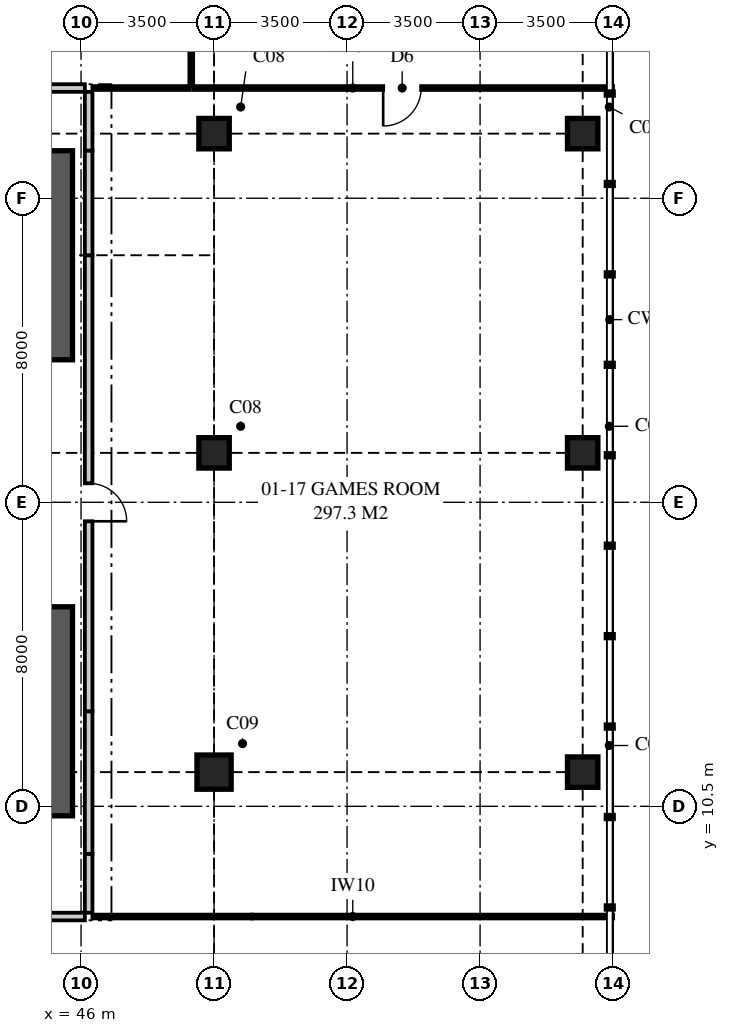
"""IFC4 building model, lengths in metres.
Left out: names, types, materials, properties, quantities, classifications, styles, units other than length and angle.
Written with IfcOpenShell. Run it as: python <this file> out.ifc"""

import sys

from ifc_helpers import new_model, si_unit, direction, frame, frame_2d, origin, origin_2d, place, context, subcontext, project, spatial, polyline, rectangle, outline, extrude, element, fill, save


model = new_model("IFC4")
c1 = context("Model", 3, precision=1e-05, world=origin(), true_north=direction((0.0, 1.0)))
c2 = subcontext(c1, "Body", "Model", "MODEL_VIEW")
j1 = project(units=[si_unit("LENGTHUNIT", "METRE"), si_unit("PLANEANGLEUNIT", "RADIAN")], contexts=[c1])
p1 = place(None, origin())
s1 = spatial("IfcSite", under=j1, at=p1, CompositionType="ELEMENT")
p2 = place(p1, origin())
s2 = spatial("IfcBuilding", under=s1, at=p2, CompositionType="ELEMENT")
p3 = place(p2, frame((0.0, 0.0, 6.0)))
s3 = spatial("IfcBuildingStorey", under=s2, at=p3, CompositionType="ELEMENT", Elevation=6.0)
p4 = place(p3, frame((49.5, 11.4, 0.0), z_axis=(0.0, 0.0, 1.0), x_axis=(1.0, 0.0, 0.0)))
e1 = element("IfcColumn", 1, at=p4, inside=s3, PredefinedType="COLUMN", context=c2, shape_type="SweptSolid", body=[
    extrude(rectangle(XDim=0.9, YDim=0.9, at=origin_2d()), origin(), (0.0, 0.0, 1.0), 5.0),
])
for number, where, z_axis, x_axis in (
    (2, (59.2, 11.4, 0.0), (0.0, 0.0, 1.0), (1.0, 0.0, 0.0)),
    (3, (49.5, 19.8, 0.0), (0.0, 0.0, 1.0), (1.0, 0.0, 0.0)),
    (4, (59.2, 19.8, 0.0), (0.0, 0.0, 1.0), (1.0, 0.0, 0.0)),
    (5, (49.5, 28.2, 0.0), (0.0, 0.0, 1.0), (1.0, 0.0, 0.0)),
    (6, (59.2, 28.2, 0.0), (0.0, 0.0, 1.0), (1.0, 0.0, 0.0)),
):
    element("IfcColumn", number, at=place(p3, frame(where, z_axis=z_axis, x_axis=x_axis)), inside=s3, PredefinedType="COLUMN", context=c2, shape_type="SweptSolid", body=[
        extrude(rectangle(XDim=0.8, YDim=0.8, at=origin_2d()), origin(), (0.0, 0.0, 1.0), 5.0),
    ])
p5 = place(p3, frame((40.05, 7.6, 0.0), z_axis=(0.0, 0.0, 1.0), x_axis=(1.0, 0.0, 0.0)))
e7 = element("IfcWall", 7, at=p5, inside=s3, PredefinedType="PARTITIONING", context=c2, shape_type="SweptSolid", body=[
    extrude(outline(polyline([(0.0, 0.0), (6.05, 0.0), (6.05, 4.72), (4.629, 4.72), (4.629, 3.92), (2.009, 3.92), (2.009, 4.72), (0.0, 4.72), (0.0, 0.0)])), frame((0.0, 0.1, 0.0), z_axis=(0.0, -1.0, 0.0), x_axis=(1.0, 0.0, 0.0)), (0.0, 0.0, 1.0), 0.2),
])
p6 = place(p5, frame((2.55, 0.0, 0.0)))
e8 = element("IfcOpeningElement", 8, at=p6, cuts=e7, PredefinedType="OPENING", context=c2, shape_type="SweptSolid", body=[
    extrude(rectangle(XDim=1.0, YDim=2.1, at=frame_2d((0.5, 1.05))), frame((0.0, 0.11, 0.0), z_axis=(0.0, -1.0, 0.0), x_axis=(1.0, 0.0, 0.0)), (0.0, 0.0, 1.0), 0.22),
])
p7 = place(p3, frame((46.3, 7.6, 0.0), z_axis=(0.0, 0.0, 1.0), x_axis=(1.0, 0.0, 0.0)))
e9 = element("IfcWall", 9, at=p7, inside=s3, PredefinedType="PARTITIONING", context=c2, shape_type="SweptSolid", body=[
    extrude(outline(polyline([(0.0, 0.0), (4.2, 0.0), (4.2, 4.72), (4.2, 4.12), (1.94, 4.12), (1.94, 4.72), (0.0, 4.72), (0.0, 0.0)])), frame((0.0, 0.05, 0.0), z_axis=(0.0, -1.0, 0.0), x_axis=(1.0, 0.0, 0.0)), (0.0, 0.0, 1.0), 0.1),
])
p8 = place(p3, frame((50.5, 7.6, 0.0), z_axis=(0.0, 0.0, 1.0), x_axis=(1.0, 0.0, 0.0)))
e10 = element("IfcWall", 10, at=p8, inside=s3, PredefinedType="PARTITIONING", context=c2, shape_type="SweptSolid", body=[
    extrude(outline(polyline([(0.0, 0.0), (9.5, 0.0), (9.5, 4.72), (9.5, 4.12), (7.44, 4.12), (7.44, 4.72), (0.26, 4.72), (0.26, 4.12), (0.0, 4.12), (0.0, 4.72), (0.0, 0.0)])), frame((0.0, 0.05, 0.0), z_axis=(0.0, -1.0, 0.0), x_axis=(1.0, 0.0, 0.0)), (0.0, 0.0, 1.0), 0.1),
])
p9 = place(p3, frame((46.2, 7.7, 0.0), z_axis=(0.0, 0.0, 1.0), x_axis=(0.0, 1.0, 0.0)))
e11 = element("IfcWall", 11, at=p9, inside=s3, PredefinedType="PARTITIONING", context=c2, shape_type="SweptSolid", body=[
    extrude(rectangle(XDim=1.55, YDim=0.2, at=frame_2d((0.775, 0.0))), origin(), (0.0, 0.0, 1.0), 4.72),
])
p10 = place(p3, frame((43.369, 29.4, 0.0), z_axis=(0.0, 0.0, 1.0), x_axis=(1.0, 0.0, 0.0)))
e12 = element("IfcWall", 12, at=p10, inside=s3, PredefinedType="PARTITIONING", context=c2, shape_type="SweptSolid", body=[
    extrude(rectangle(XDim=2.731, YDim=0.2, at=frame_2d((1.366, 0.0))), origin(), (0.0, 0.0, 1.0), 4.12),
])
p11 = place(p3, frame((46.2, 27.75, 0.0), z_axis=(0.0, 0.0, 1.0), x_axis=(0.0, 1.0, 0.0)))
e13 = element("IfcWall", 13, at=p11, inside=s3, PredefinedType="PARTITIONING", context=c2, shape_type="SweptSolid", body=[
    extrude(outline(polyline([(0.0, 0.0), (1.55, 0.0), (1.55, 4.72), (1.55, 4.12), (0.0, 4.12), (0.0, 4.72), (0.0, 0.0)])), frame((0.0, 0.1, 0.0), z_axis=(0.0, -1.0, 0.0), x_axis=(1.0, 0.0, 0.0)), (0.0, 0.0, 1.0), 0.2),
])
p12 = place(p3, frame((46.2, 9.25, 0.0), z_axis=(0.0, 0.0, 1.0), x_axis=(0.0, 1.0, 0.0)))
e14 = element("IfcWall", 14, at=p12, inside=s3, PredefinedType="PARTITIONING", context=c2, shape_type="SweptSolid", body=[
    extrude(outline(polyline([(0.0, 0.0), (3.75, 0.0), (3.75, 4.12), (3.64, 4.12), (3.64, 4.72), (3.46, 4.72), (3.46, 4.12), (0.84, 4.12), (0.84, 4.72), (0.0, 4.72), (0.0, 0.0)])), frame((0.0, 0.1, 0.0), z_axis=(0.0, -1.0, 0.0), x_axis=(1.0, 0.0, 0.0)), (0.0, 0.0, 1.0), 0.2),
])
p13 = place(p3, frame((46.2, 13.0, 0.0), z_axis=(0.0, 0.0, 1.0), x_axis=(0.0, 1.0, 0.0)))
e15 = element("IfcWall", 15, at=p13, inside=s3, PredefinedType="PARTITIONING", context=c2, shape_type="SweptSolid", body=[
    extrude(rectangle(XDim=12.0, YDim=0.2, at=frame_2d((6.0, 0.0))), origin(), (0.0, 0.0, 1.0), 4.12),
])
p14 = place(p13, frame((5.0, 0.0, 0.0)))
e16 = element("IfcOpeningElement", 16, at=p14, cuts=e15, PredefinedType="OPENING", context=c2, shape_type="SweptSolid", body=[
    extrude(rectangle(XDim=1.0, YDim=2.1, at=frame_2d((0.5, 1.05))), frame((0.0, 0.11, 0.0), z_axis=(0.0, -1.0, 0.0), x_axis=(1.0, 0.0, 0.0)), (0.0, 0.0, 1.0), 0.22),
])
p15 = place(p3, frame((46.2, 25.0, 0.0), z_axis=(0.0, 0.0, 1.0), x_axis=(0.0, 1.0, 0.0)))
e17 = element("IfcWall", 17, at=p15, inside=s3, PredefinedType="PARTITIONING", context=c2, shape_type="SweptSolid", body=[
    extrude(outline(polyline([(0.0, 0.0), (2.75, 0.0), (2.75, 4.12), (1.89, 4.12), (1.89, 4.72), (1.31, 4.72), (1.31, 4.12), (0.0, 4.12), (0.0, 0.0)])), frame((0.0, 0.1, 0.0), z_axis=(0.0, -1.0, 0.0), x_axis=(1.0, 0.0, 0.0)), (0.0, 0.0, 1.0), 0.2),
])
p16 = place(p3, frame((46.3, 29.4, 0.0), z_axis=(0.0, 0.0, 1.0), x_axis=(1.0, 0.0, 0.0)))
e18 = element("IfcWall", 18, at=p16, inside=s3, PredefinedType="PARTITIONING", context=c2, shape_type="SweptSolid", body=[
    extrude(outline(polyline([(0.0, 0.0), (2.55, 0.0), (2.55, 4.72), (2.55, 4.12), (0.0, 4.12), (0.0, 4.72), (0.0, 0.0)])), frame((0.0, 0.05, 0.0), z_axis=(0.0, -1.0, 0.0), x_axis=(1.0, 0.0, 0.0)), (0.0, 0.0, 1.0), 0.1),
])
p17 = place(p3, frame((48.9, 29.45, 0.0), z_axis=(0.0, 0.0, 1.0), x_axis=(0.0, 1.0, 0.0)))
e19 = element("IfcWall", 19, at=p17, inside=s3, PredefinedType="PARTITIONING", context=c2, shape_type="SweptSolid", body=[
    extrude(outline(polyline([(0.0, 0.0), (16.55, 0.0), (16.55, 4.72), (16.55, 4.12), (15.81, 4.12), (7.21, 4.12), (0.01, 4.12), (0.0, 4.12), (0.0, 4.72), (0.0, 0.0)])), frame((0.0, 0.05, 0.0), z_axis=(0.0, -1.0, 0.0), x_axis=(1.0, 0.0, 0.0)), (0.0, 0.0, 1.0), 0.1),
])
p18 = place(p17, frame((7.75, 0.0, 0.0)))
e20 = element("IfcOpeningElement", 20, at=p18, cuts=e19, PredefinedType="OPENING", context=c2, shape_type="SweptSolid", body=[
    extrude(rectangle(XDim=1.0, YDim=2.1, at=frame_2d((0.5, 1.05))), frame((0.0, 0.06, 0.0), z_axis=(0.0, -1.0, 0.0), x_axis=(1.0, 0.0, 0.0)), (0.0, 0.0, 1.0), 0.12),
])
p19 = place(p3, frame((48.95, 29.4, 0.0), z_axis=(0.0, 0.0, 1.0), x_axis=(1.0, 0.0, 0.0)))
e21 = element("IfcWall", 21, at=p19, inside=s3, PredefinedType="PARTITIONING", context=c2, shape_type="SweptSolid", body=[
    extrude(outline(polyline([(0.0, 0.0), (11.05, 0.0), (11.05, 4.72), (11.05, 4.12), (10.31, 4.12), (1.81, 4.12), (0.61, 4.12), (0.0, 4.12), (0.0, 4.72), (0.0, 0.0)])), frame((0.0, 0.05, 0.0), z_axis=(0.0, -1.0, 0.0), x_axis=(1.0, 0.0, 0.0)), (0.0, 0.0, 1.0), 0.1),
])
p20 = place(p19, frame((5.0, 0.0, 0.0)))
e22 = element("IfcOpeningElement", 22, at=p20, cuts=e21, PredefinedType="OPENING", context=c2, shape_type="SweptSolid", body=[
    extrude(rectangle(XDim=1.0, YDim=2.1, at=frame_2d((0.5, 1.05))), frame((0.0, 0.06, 0.0), z_axis=(0.0, -1.0, 0.0), x_axis=(1.0, 0.0, 0.0)), (0.0, 0.0, 1.0), 0.12),
])
for number, where, z_axis, x_axis in (
    (23, (45.05, 10.25, 0.0), (0.0, 0.0, 1.0), (0.0, 1.0, 0.0)),
    (24, (45.05, 22.25, 0.0), (0.0, 0.0, 1.0), (0.0, 1.0, 0.0)),
):
    element("IfcWall", number, at=place(p3, frame(where, z_axis=z_axis, x_axis=x_axis)), inside=s3, PredefinedType="SHEAR", context=c2, shape_type="SweptSolid", body=[
        extrude(rectangle(XDim=5.5, YDim=1.45, at=frame_2d((2.75, 0.0))), origin(), (0.0, 0.0, 1.0), 5.0),
    ])
p21 = place(p14, frame((1.0, 0.0, 0.0), z_axis=(0.0, 0.0, 1.0), x_axis=(-1.0, 0.0, 0.0)))
e25 = element("IfcDoor", 25, at=p21, inside=s3, OperationType="SINGLE_SWING_RIGHT", PredefinedType="DOOR", context=c2, shape_type="SweptSolid", body=[
    extrude(rectangle(XDim=1.0, YDim=2.1, at=frame_2d((0.5, 1.05))), frame((0.0, 0.025, 0.0), z_axis=(0.0, -1.0, 0.0), x_axis=(1.0, 0.0, 0.0)), (0.0, 0.0, 1.0), 0.05),
])
fill(e16, e25)
p22 = place(p20, frame((1.0, 0.0, 0.0), z_axis=(0.0, 0.0, 1.0), x_axis=(-1.0, 0.0, 0.0)))
e26 = element("IfcDoor", 26, at=p22, inside=s3, OperationType="SINGLE_SWING_RIGHT", PredefinedType="DOOR", context=c2, shape_type="SweptSolid", body=[
    extrude(rectangle(XDim=1.0, YDim=2.1, at=frame_2d((0.5, 1.05))), frame((0.0, 0.025, 0.0), z_axis=(0.0, -1.0, 0.0), x_axis=(1.0, 0.0, 0.0)), (0.0, 0.0, 1.0), 0.05),
])
fill(e22, e26)
save(model, sys.argv[1])
